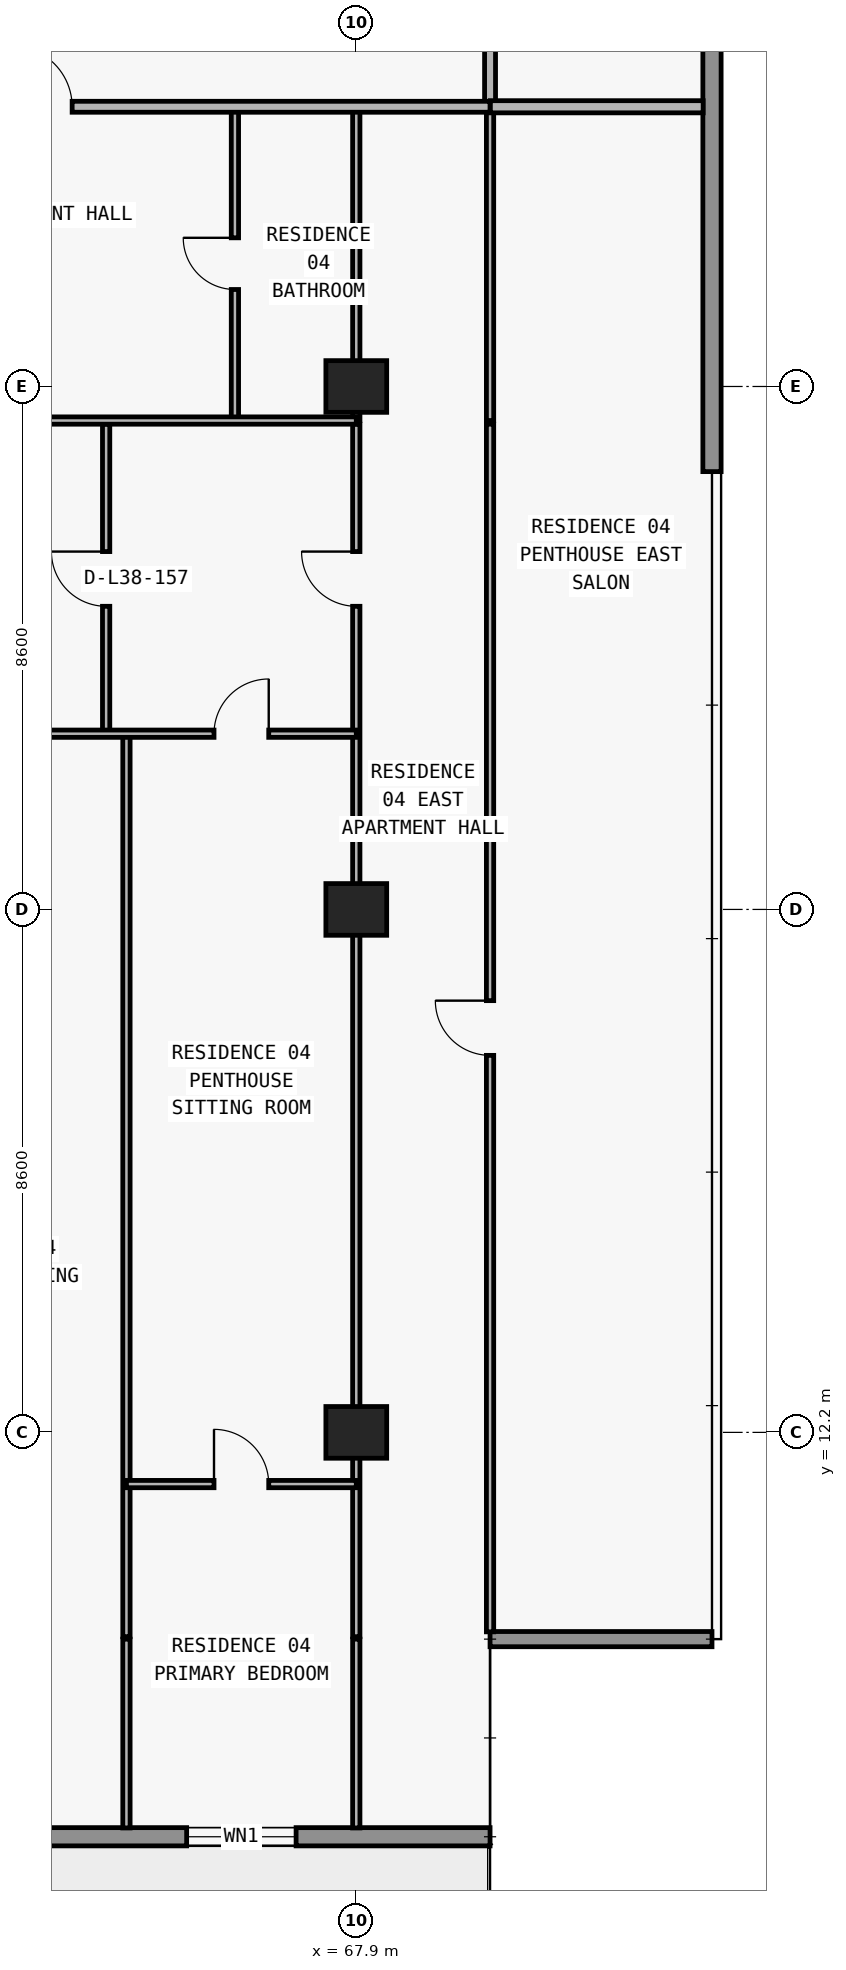
"""IFC4 building model, lengths in metres.
Left out: names, types, materials, properties, quantities, classifications, styles, units other than length and angle.
Written with IfcOpenShell. Run it as: python <this file> out.ifc"""

import sys

from ifc_helpers import new_model, si_unit, direction, frame, frame_2d, origin, origin_2d, place, context, subcontext, project, spatial, rectangle, extrude, element, fill, save


model = new_model("IFC4")
c1 = context("Model", 3, precision=1e-05, world=origin(), true_north=direction((0.0, 1.0)))
c2 = subcontext(c1, "Body", "Model", "MODEL_VIEW")
j1 = project(units=[si_unit("LENGTHUNIT", "METRE"), si_unit("PLANEANGLEUNIT", "RADIAN")], contexts=[c1])
p1 = place(None, origin())
s1 = spatial("IfcSite", under=j1, at=p1, CompositionType="ELEMENT")
p2 = place(p1, origin())
s2 = spatial("IfcBuilding", under=s1, at=p2, CompositionType="ELEMENT")
p3 = place(p2, frame((0.0, 0.0, 138.9)))
s3 = spatial("IfcBuildingStorey", under=s2, at=p3, CompositionType="ELEMENT", Elevation=138.9)
for number, where, z_axis, x_axis in (
    (1, (67.9, 12.2, 0.0), (0.0, 0.0, 1.0), (1.0, 0.0, 0.0)),
    (2, (67.9, 20.8, 0.0), (0.0, 0.0, 1.0), (1.0, 0.0, 0.0)),
    (3, (67.9, 29.4, 0.0), (0.0, 0.0, 1.0), (1.0, 0.0, 0.0)),
):
    element("IfcColumn", number, at=place(p3, frame(where, z_axis=z_axis, x_axis=x_axis)), inside=s3, PredefinedType="COLUMN", context=c2, shape_type="SweptSolid", body=[
        extrude(rectangle(XDim=1.0, YDim=0.85, at=origin_2d()), origin(), (0.0, 0.0, 1.0), 3.05),
    ])
p4 = place(p3, frame((70.1, 5.55, 0.0), z_axis=(0.0, 0.0, 1.0), x_axis=(-1.0, 0.0, 0.0)))
e4 = element("IfcWall", 4, at=p4, inside=s3, PredefinedType="STANDARD", context=c2, shape_type="SweptSolid", body=[
    extrude(rectangle(XDim=62.4, YDim=0.3, at=frame_2d((31.2, 0.0))), origin(), (0.0, 0.0, 1.0), 3.05),
])
p5 = place(p4, frame((57.29, 0.0, 0.0)))
e5 = element("IfcOpeningElement", 5, at=p5, cuts=e4, PredefinedType="OPENING", context=c2, shape_type="SweptSolid", body=[
    extrude(rectangle(XDim=2.0, YDim=2.3, at=frame_2d((1.0, 1.15))), frame((0.0, 0.16, 0.0), z_axis=(0.0, -1.0, 0.0), x_axis=(1.0, 0.0, 0.0)), (0.0, 0.0, 1.0), 0.32),
])
p6 = place(p4, frame((52.61, 0.0, 0.65)))
e6 = element("IfcOpeningElement", 6, at=p6, cuts=e4, PredefinedType="OPENING", context=c2, shape_type="SweptSolid", body=[
    extrude(rectangle(XDim=2.6, YDim=1.85, at=frame_2d((1.3, 0.925))), frame((0.0, 0.16, 0.0), z_axis=(0.0, -1.0, 0.0), x_axis=(1.0, 0.0, 0.0)), (0.0, 0.0, 1.0), 0.32),
])
p7 = place(p4, frame((46.5, 0.0, 0.85)))
e7 = element("IfcOpeningElement", 7, at=p7, cuts=e4, PredefinedType="OPENING", context=c2, shape_type="SweptSolid", body=[
    extrude(rectangle(XDim=2.2, YDim=1.55, at=frame_2d((1.1, 0.775))), frame((0.0, 0.16, 0.0), z_axis=(0.0, -1.0, 0.0), x_axis=(1.0, 0.0, 0.0)), (0.0, 0.0, 1.0), 0.32),
])
p8 = place(p4, frame((40.49, 0.0, 0.0)))
e8 = element("IfcOpeningElement", 8, at=p8, cuts=e4, PredefinedType="OPENING", context=c2, shape_type="SweptSolid", body=[
    extrude(rectangle(XDim=2.0, YDim=2.3, at=frame_2d((1.0, 1.15))), frame((0.0, 0.16, 0.0), z_axis=(0.0, -1.0, 0.0), x_axis=(1.0, 0.0, 0.0)), (0.0, 0.0, 1.0), 0.32),
])
p9 = place(p4, frame((35.81, 0.0, 0.65)))
e9 = element("IfcOpeningElement", 9, at=p9, cuts=e4, PredefinedType="OPENING", context=c2, shape_type="SweptSolid", body=[
    extrude(rectangle(XDim=2.6, YDim=1.85, at=frame_2d((1.3, 0.925))), frame((0.0, 0.16, 0.0), z_axis=(0.0, -1.0, 0.0), x_axis=(1.0, 0.0, 0.0)), (0.0, 0.0, 1.0), 0.32),
])
p10 = place(p4, frame((30.1, 0.0, 0.85)))
e10 = element("IfcOpeningElement", 10, at=p10, cuts=e4, PredefinedType="OPENING", context=c2, shape_type="SweptSolid", body=[
    extrude(rectangle(XDim=2.2, YDim=1.55, at=frame_2d((1.1, 0.775))), frame((0.0, 0.16, 0.0), z_axis=(0.0, -1.0, 0.0), x_axis=(1.0, 0.0, 0.0)), (0.0, 0.0, 1.0), 0.32),
])
p11 = place(p4, frame((22.1, 0.0, 0.85)))
e11 = element("IfcOpeningElement", 11, at=p11, cuts=e4, PredefinedType="OPENING", context=c2, shape_type="SweptSolid", body=[
    extrude(rectangle(XDim=2.2, YDim=1.55, at=frame_2d((1.1, 0.775))), frame((0.0, 0.16, 0.0), z_axis=(0.0, -1.0, 0.0), x_axis=(1.0, 0.0, 0.0)), (0.0, 0.0, 1.0), 0.32),
])
p12 = place(p4, frame((16.026, 0.0, 0.0)))
e12 = element("IfcOpeningElement", 12, at=p12, cuts=e4, PredefinedType="OPENING", context=c2, shape_type="SweptSolid", body=[
    extrude(rectangle(XDim=2.0, YDim=2.3, at=frame_2d((1.0, 1.15))), frame((0.0, 0.16, 0.0), z_axis=(0.0, -1.0, 0.0), x_axis=(1.0, 0.0, 0.0)), (0.0, 0.0, 1.0), 0.32),
])
p13 = place(p4, frame((11.726, 0.0, 0.85)))
e13 = element("IfcOpeningElement", 13, at=p13, cuts=e4, PredefinedType="OPENING", context=c2, shape_type="SweptSolid", body=[
    extrude(rectangle(XDim=2.2, YDim=1.55, at=frame_2d((1.1, 0.775))), frame((0.0, 0.16, 0.0), z_axis=(0.0, -1.0, 0.0), x_axis=(1.0, 0.0, 0.0)), (0.0, 0.0, 1.0), 0.32),
])
p14 = place(p4, frame((7.29, 0.0, 0.0)))
e14 = element("IfcOpeningElement", 14, at=p14, cuts=e4, PredefinedType="OPENING", context=c2, shape_type="SweptSolid", body=[
    extrude(rectangle(XDim=2.0, YDim=2.3, at=frame_2d((1.0, 1.15))), frame((0.0, 0.16, 0.0), z_axis=(0.0, -1.0, 0.0), x_axis=(1.0, 0.0, 0.0)), (0.0, 0.0, 1.0), 0.32),
])
p15 = place(p4, frame((3.19, 0.0, 0.85)))
e15 = element("IfcOpeningElement", 15, at=p15, cuts=e4, PredefinedType="OPENING", context=c2, shape_type="SweptSolid", body=[
    extrude(rectangle(XDim=1.8, YDim=1.55, at=frame_2d((0.9, 0.775))), frame((0.0, 0.16, 0.0), z_axis=(0.0, -1.0, 0.0), x_axis=(1.0, 0.0, 0.0)), (0.0, 0.0, 1.0), 0.32),
])
p16 = place(p3, frame((70.1, 8.8, 0.0), z_axis=(0.0, 0.0, 1.0), x_axis=(1.0, 0.0, 0.0)))
e16 = element("IfcWall", 16, at=p16, inside=s3, PredefinedType="ELEMENTEDWALL", context=c2, shape_type="SweptSolid", body=[
    extrude(rectangle(XDim=3.65, YDim=0.25, at=frame_2d((1.825, 0.0))), origin(), (0.0, 0.0, 1.0), 3.05),
])
p17 = place(p3, frame((73.75, 47.2, 0.0), z_axis=(0.0, 0.0, 1.0), x_axis=(0.0, -1.0, 0.0)))
e17 = element("IfcWall", 17, at=p17, inside=s3, PredefinedType="STANDARD", context=c2, shape_type="SweptSolid", body=[
    extrude(rectangle(XDim=19.2, YDim=0.3, at=frame_2d((9.6, 0.0))), origin(), (0.0, 0.0, 1.0), 3.05),
])
p18 = place(p3, frame((63.786, 23.69, 0.0), z_axis=(0.0, 0.0, 1.0), x_axis=(0.0, 1.0, 0.0)))
e18 = element("IfcWall", 18, at=p18, inside=s3, PredefinedType="PARTITIONING", context=c2, shape_type="SweptSolid", body=[
    extrude(rectangle(XDim=5.09, YDim=0.12, at=frame_2d((2.545, 0.0))), origin(), (0.0, 0.0, 1.0), 3.05),
])
p19 = place(p18, frame((2.095, 0.0, 0.0)))
e19 = element("IfcOpeningElement", 19, at=p19, cuts=e18, PredefinedType="OPENING", context=c2, shape_type="SweptSolid", body=[
    extrude(rectangle(XDim=0.9, YDim=2.15, at=frame_2d((0.45, 1.075))), frame((0.0, 0.07, 0.0), z_axis=(0.0, -1.0, 0.0), x_axis=(1.0, 0.0, 0.0)), (0.0, 0.0, 1.0), 0.14),
])
p20 = place(p3, frame((64.12, 5.695, 0.0), z_axis=(0.0, 0.0, 1.0), x_axis=(0.0, 1.0, 0.0)))
e20 = element("IfcWall", 20, at=p20, inside=s3, PredefinedType="PARTITIONING", context=c2, shape_type="SweptSolid", body=[
    extrude(rectangle(XDim=3.105, YDim=0.12, at=frame_2d((1.552, 0.0))), origin(), (0.0, 0.0, 1.0), 3.05),
])
p21 = place(p3, frame((64.12, 8.84, 0.0), z_axis=(0.0, 0.0, 1.0), x_axis=(0.0, 1.0, 0.0)))
e21 = element("IfcWall", 21, at=p21, inside=s3, PredefinedType="PARTITIONING", context=c2, shape_type="SweptSolid", body=[
    extrude(rectangle(XDim=14.85, YDim=0.12, at=frame_2d((7.425, 0.0))), origin(), (0.0, 0.0, 1.0), 3.05),
])
p22 = place(p3, frame((65.904, 28.84, 0.0), z_axis=(0.0, 0.0, 1.0), x_axis=(0.0, 1.0, 0.0)))
e22 = element("IfcWall", 22, at=p22, inside=s3, PredefinedType="PARTITIONING", context=c2, shape_type="SweptSolid", body=[
    extrude(rectangle(XDim=5.16, YDim=0.12, at=frame_2d((2.58, 0.0))), origin(), (0.0, 0.0, 1.0), 3.05),
])
p23 = place(p22, frame((2.155, 0.0, 0.0)))
e23 = element("IfcOpeningElement", 23, at=p23, cuts=e22, PredefinedType="OPENING", context=c2, shape_type="SweptSolid", body=[
    extrude(rectangle(XDim=0.85, YDim=2.1, at=frame_2d((0.425, 1.05))), frame((0.0, 0.07, 0.0), z_axis=(0.0, -1.0, 0.0), x_axis=(1.0, 0.0, 0.0)), (0.0, 0.0, 1.0), 0.14),
])
p24 = place(p3, frame((67.9, 5.695, 0.0), z_axis=(0.0, 0.0, 1.0), x_axis=(0.0, 1.0, 0.0)))
e24 = element("IfcWall", 24, at=p24, inside=s3, PredefinedType="PARTITIONING", context=c2, shape_type="SweptSolid", body=[
    extrude(rectangle(XDim=3.105, YDim=0.12, at=frame_2d((1.552, 0.0))), origin(), (0.0, 0.0, 1.0), 3.05),
])
p25 = place(p3, frame((67.9, 8.84, 0.0), z_axis=(0.0, 0.0, 1.0), x_axis=(0.0, 1.0, 0.0)))
e25 = element("IfcWall", 25, at=p25, inside=s3, PredefinedType="PARTITIONING", context=c2, shape_type="SweptSolid", body=[
    extrude(rectangle(XDim=19.94, YDim=0.12, at=frame_2d((9.97, 0.0))), origin(), (0.0, 0.0, 1.0), 2.174),
])
p26 = place(p25, frame((16.945, 0.0, 0.0)))
e26 = element("IfcOpeningElement", 26, at=p26, cuts=e25, PredefinedType="OPENING", context=c2, shape_type="SweptSolid", body=[
    extrude(rectangle(XDim=0.9, YDim=2.124, at=frame_2d((0.45, 1.062))), frame((0.0, 0.07, 0.0), z_axis=(0.0, -1.0, 0.0), x_axis=(1.0, 0.0, 0.0)), (0.0, 0.0, 1.0), 0.14),
])
p27 = place(p3, frame((67.9, 28.84, 0.0), z_axis=(0.0, 0.0, 1.0), x_axis=(0.0, 1.0, 0.0)))
e27 = element("IfcWall", 27, at=p27, inside=s3, PredefinedType="PARTITIONING", context=c2, shape_type="SweptSolid", body=[
    extrude(rectangle(XDim=5.16, YDim=0.12, at=frame_2d((2.58, 0.0))), origin(), (0.0, 0.0, 1.0), 2.174),
])
p28 = place(p3, frame((70.1, 8.92, 0.0), z_axis=(0.0, 0.0, 1.0), x_axis=(0.0, 1.0, 0.0)))
e28 = element("IfcWall", 28, at=p28, inside=s3, PredefinedType="PARTITIONING", context=c2, shape_type="SweptSolid", body=[
    extrude(rectangle(XDim=19.86, YDim=0.12, at=frame_2d((9.93, 0.0))), origin(), (0.0, 0.0, 1.0), 3.05),
])
p29 = place(p28, frame((9.48, 0.0, 0.0)))
e29 = element("IfcOpeningElement", 29, at=p29, cuts=e28, PredefinedType="OPENING", context=c2, shape_type="SweptSolid", body=[
    extrude(rectangle(XDim=0.9, YDim=2.15, at=frame_2d((0.45, 1.075))), frame((0.0, 0.07, 0.0), z_axis=(0.0, -1.0, 0.0), x_axis=(1.0, 0.0, 0.0)), (0.0, 0.0, 1.0), 0.14),
])
p30 = place(p3, frame((70.1, 28.84, 0.0), z_axis=(0.0, 0.0, 1.0), x_axis=(0.0, 1.0, 0.0)))
e30 = element("IfcWall", 30, at=p30, inside=s3, PredefinedType="PARTITIONING", context=c2, shape_type="SweptSolid", body=[
    extrude(rectangle(XDim=5.16, YDim=0.12, at=frame_2d((2.58, 0.0))), origin(), (0.0, 0.0, 1.0), 3.05),
])
p31 = place(p3, frame((70.1, 34.005, 0.0), z_axis=(0.0, 0.0, 1.0), x_axis=(0.0, 1.0, 0.0)))
e31 = element("IfcWall", 31, at=p31, inside=s3, PredefinedType="PARTITIONING", context=c2, shape_type="SweptSolid", body=[
    extrude(rectangle(XDim=2.945, YDim=0.18, at=frame_2d((1.473, 0.0))), origin(), (0.0, 0.0, 1.0), 3.05),
])
p32 = place(p3, frame((64.12, 11.35, 0.0), z_axis=(0.0, 0.0, 1.0), x_axis=(1.0, 0.0, 0.0)))
e32 = element("IfcWall", 32, at=p32, inside=s3, PredefinedType="PARTITIONING", context=c2, shape_type="SweptSolid", body=[
    extrude(rectangle(XDim=3.78, YDim=0.12, at=frame_2d((1.89, 0.0))), origin(), (0.0, 0.0, 1.0), 3.05),
])
p33 = place(p32, frame((1.44, 0.0, 0.0)))
e33 = element("IfcOpeningElement", 33, at=p33, cuts=e32, PredefinedType="OPENING", context=c2, shape_type="SweptSolid", body=[
    extrude(rectangle(XDim=0.9, YDim=2.15, at=frame_2d((0.45, 1.075))), frame((0.0, 0.07, 0.0), z_axis=(0.0, -1.0, 0.0), x_axis=(1.0, 0.0, 0.0)), (0.0, 0.0, 1.0), 0.14),
])
p34 = place(p3, frame((59.55, 23.69, 0.0), z_axis=(0.0, 0.0, 1.0), x_axis=(1.0, 0.0, 0.0)))
e34 = element("IfcWall", 34, at=p34, inside=s3, PredefinedType="PARTITIONING", context=c2, shape_type="SweptSolid", body=[
    extrude(rectangle(XDim=8.35, YDim=0.12, at=frame_2d((4.175, 0.0))), origin(), (0.0, 0.0, 1.0), 3.05),
])
p35 = place(p34, frame((1.668, 0.0, 0.0)))
e35 = element("IfcOpeningElement", 35, at=p35, cuts=e34, PredefinedType="OPENING", context=c2, shape_type="SweptSolid", body=[
    extrude(rectangle(XDim=0.9, YDim=2.15, at=frame_2d((0.45, 1.075))), frame((0.0, 0.07, 0.0), z_axis=(0.0, -1.0, 0.0), x_axis=(1.0, 0.0, 0.0)), (0.0, 0.0, 1.0), 0.14),
])
p36 = place(p34, frame((6.01, 0.0, 0.0)))
e36 = element("IfcOpeningElement", 36, at=p36, cuts=e34, PredefinedType="OPENING", context=c2, shape_type="SweptSolid", body=[
    extrude(rectangle(XDim=0.9, YDim=2.15, at=frame_2d((0.45, 1.075))), frame((0.0, 0.07, 0.0), z_axis=(0.0, -1.0, 0.0), x_axis=(1.0, 0.0, 0.0)), (0.0, 0.0, 1.0), 0.14),
])
p37 = place(p3, frame((59.55, 28.84, 0.0), z_axis=(0.0, 0.0, 1.0), x_axis=(1.0, 0.0, 0.0)))
e37 = element("IfcWall", 37, at=p37, inside=s3, PredefinedType="PARTITIONING", context=c2, shape_type="SweptSolid", body=[
    extrude(rectangle(XDim=8.35, YDim=0.12, at=frame_2d((4.175, 0.0))), origin(), (0.0, 0.0, 1.0), 3.05),
])
p38 = place(p37, frame((1.668, 0.0, 0.0)))
e38 = element("IfcOpeningElement", 38, at=p38, cuts=e37, PredefinedType="OPENING", context=c2, shape_type="SweptSolid", body=[
    extrude(rectangle(XDim=0.9, YDim=2.15, at=frame_2d((0.45, 1.075))), frame((0.0, 0.07, 0.0), z_axis=(0.0, -1.0, 0.0), x_axis=(1.0, 0.0, 0.0)), (0.0, 0.0, 1.0), 0.14),
])
p39 = place(p3, frame((59.55, 34.0, 0.0), z_axis=(0.0, 0.0, 1.0), x_axis=(1.0, 0.0, 0.0)))
e39 = element("IfcWall", 39, at=p39, inside=s3, PredefinedType="PARTITIONING", context=c2, shape_type="SweptSolid", body=[
    extrude(rectangle(XDim=10.55, YDim=0.18, at=frame_2d((5.275, 0.0))), origin(), (0.0, 0.0, 1.0), 3.05),
])
p40 = place(p39, frame((2.677, 0.0, 0.0)))
e40 = element("IfcOpeningElement", 40, at=p40, cuts=e39, PredefinedType="OPENING", context=c2, shape_type="SweptSolid", body=[
    extrude(rectangle(XDim=1.0, YDim=2.2, at=frame_2d((0.5, 1.1))), frame((0.0, 0.1, 0.0), z_axis=(0.0, -1.0, 0.0), x_axis=(1.0, 0.0, 0.0)), (0.0, 0.0, 1.0), 0.2),
])
p41 = place(p3, frame((70.105, 34.0, 0.0), z_axis=(0.0, 0.0, 1.0), x_axis=(1.0, 0.0, 0.0)))
e41 = element("IfcWall", 41, at=p41, inside=s3, PredefinedType="PARTITIONING", context=c2, shape_type="SweptSolid", body=[
    extrude(rectangle(XDim=3.5, YDim=0.2, at=frame_2d((1.75, 0.0))), origin(), (0.0, 0.0, 1.0), 3.05),
])
p42 = place(p15, origin())
e42 = element("IfcWindow", 42, at=p42, inside=s3, PartitioningType="SINGLE_PANEL", PredefinedType="WINDOW", context=c2, shape_type="SweptSolid", body=[
    extrude(rectangle(XDim=1.8, YDim=1.55, at=frame_2d((0.9, 0.775))), frame((0.0, 0.03, 0.0), z_axis=(0.0, -1.0, 0.0), x_axis=(1.0, 0.0, 0.0)), (0.0, 0.0, 1.0), 0.06),
])
fill(e15, e42)
p43 = place(p40, origin())
e43 = element("IfcDoor", 43, at=p43, inside=s3, OperationType="SINGLE_SWING_LEFT", PredefinedType="DOOR", context=c2, shape_type="SweptSolid", body=[
    extrude(rectangle(XDim=1.0, YDim=2.2, at=frame_2d((0.5, 1.1))), frame((0.0, 0.025, 0.0), z_axis=(0.0, -1.0, 0.0), x_axis=(1.0, 0.0, 0.0)), (0.0, 0.0, 1.0), 0.05),
])
fill(e40, e43)
p44 = place(p23, origin())
e44 = element("IfcDoor", 44, at=p44, inside=s3, OperationType="SINGLE_SWING_RIGHT", PredefinedType="DOOR", context=c2, shape_type="SweptSolid", body=[
    extrude(rectangle(XDim=0.85, YDim=2.1, at=frame_2d((0.425, 1.05))), frame((0.0, 0.025, 0.0), z_axis=(0.0, -1.0, 0.0), x_axis=(1.0, 0.0, 0.0)), (0.0, 0.0, 1.0), 0.05),
])
fill(e23, e44)
p45 = place(p19, origin())
e45 = element("IfcDoor", 45, at=p45, inside=s3, OperationType="SINGLE_SWING_RIGHT", PredefinedType="DOOR", context=c2, shape_type="SweptSolid", body=[
    extrude(rectangle(XDim=0.9, YDim=2.15, at=frame_2d((0.45, 1.075))), frame((0.0, 0.025, 0.0), z_axis=(0.0, -1.0, 0.0), x_axis=(1.0, 0.0, 0.0)), (0.0, 0.0, 1.0), 0.05),
])
fill(e19, e45)
p46 = place(p36, origin())
e46 = element("IfcDoor", 46, at=p46, inside=s3, OperationType="SINGLE_SWING_RIGHT", PredefinedType="DOOR", context=c2, shape_type="SweptSolid", body=[
    extrude(rectangle(XDim=0.9, YDim=2.15, at=frame_2d((0.45, 1.075))), frame((0.0, 0.025, 0.0), z_axis=(0.0, -1.0, 0.0), x_axis=(1.0, 0.0, 0.0)), (0.0, 0.0, 1.0), 0.05),
])
fill(e36, e46)
p47 = place(p33, origin())
e47 = element("IfcDoor", 47, at=p47, inside=s3, OperationType="SINGLE_SWING_LEFT", PredefinedType="DOOR", context=c2, shape_type="SweptSolid", body=[
    extrude(rectangle(XDim=0.9, YDim=2.15, at=frame_2d((0.45, 1.075))), frame((0.0, 0.025, 0.0), z_axis=(0.0, -1.0, 0.0), x_axis=(1.0, 0.0, 0.0)), (0.0, 0.0, 1.0), 0.05),
])
fill(e33, e47)
p48 = place(p26, origin())
e48 = element("IfcDoor", 48, at=p48, inside=s3, OperationType="SINGLE_SWING_RIGHT", PredefinedType="DOOR", context=c2, shape_type="SweptSolid", body=[
    extrude(rectangle(XDim=0.9, YDim=2.124, at=frame_2d((0.45, 1.062))), frame((0.0, 0.025, 0.0), z_axis=(0.0, -1.0, 0.0), x_axis=(1.0, 0.0, 0.0)), (0.0, 0.0, 1.0), 0.05),
])
fill(e26, e48)
p49 = place(p29, origin())
e49 = element("IfcDoor", 49, at=p49, inside=s3, OperationType="SINGLE_SWING_RIGHT", PredefinedType="DOOR", context=c2, shape_type="SweptSolid", body=[
    extrude(rectangle(XDim=0.9, YDim=2.15, at=frame_2d((0.45, 1.075))), frame((0.0, 0.025, 0.0), z_axis=(0.0, -1.0, 0.0), x_axis=(1.0, 0.0, 0.0)), (0.0, 0.0, 1.0), 0.05),
])
fill(e29, e49)
save(model, sys.argv[1])
